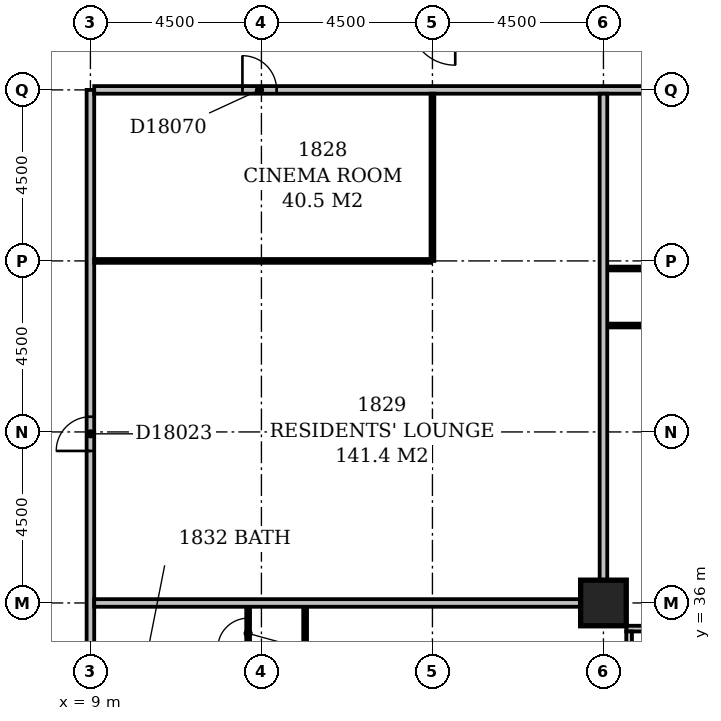
"""IFC4 building model, lengths in metres.
Left out: names, types, materials, properties, quantities, classifications, styles, units other than length and angle.
Written with IfcOpenShell. Run it as: python <this file> out.ifc"""

import sys

from ifc_helpers import new_model, si_unit, direction, frame, frame_2d, origin, origin_2d, place, context, subcontext, project, spatial, rectangle, extrude, element, fill, save


model = new_model("IFC4")
c1 = context("Model", 3, precision=1e-05, world=origin(), true_north=direction((0.0, 1.0)))
c2 = subcontext(c1, "Body", "Model", "MODEL_VIEW")
j1 = project(units=[si_unit("LENGTHUNIT", "METRE"), si_unit("PLANEANGLEUNIT", "RADIAN")], contexts=[c1])
p1 = place(None, origin())
s1 = spatial("IfcSite", under=j1, at=p1, CompositionType="ELEMENT")
p2 = place(p1, origin())
s2 = spatial("IfcBuilding", under=s1, at=p2, CompositionType="ELEMENT")
p3 = place(p2, frame((0.0, 0.0, 75.8)))
s3 = spatial("IfcBuildingStorey", under=s2, at=p3, CompositionType="ELEMENT", Elevation=75.8)
p4 = place(p3, frame((22.5, 36.0, -0.3), z_axis=(0.0, 0.0, 1.0), x_axis=(1.0, 0.0, 0.0)))
e1 = element("IfcColumn", 1, at=p4, inside=s3, PredefinedType="COLUMN", context=c2, shape_type="SweptSolid", body=[
    extrude(rectangle(XDim=1.2, YDim=1.2, at=origin_2d()), origin(), (0.0, 0.0, 1.0), 3.6),
])
p5 = place(p3, frame((23.175, 17.4, 0.0), z_axis=(0.0, 0.0, 1.0), x_axis=(0.0, 1.0, 0.0)))
e2 = element("IfcWall", 2, at=p5, inside=s3, PredefinedType="STANDARD", context=c2, shape_type="SweptSolid", body=[
    extrude(rectangle(XDim=17.85, YDim=0.15, at=frame_2d((8.925, 0.0))), origin(), (0.0, 0.0, 1.0), 2.7),
])
p6 = place(p5, frame((1.65, 0.0, 0.6)))
e3 = element("IfcOpeningElement", 3, at=p6, cuts=e2, PredefinedType="OPENING", context=c2, shape_type="SweptSolid", body=[
    extrude(rectangle(XDim=2.4, YDim=1.8, at=frame_2d((1.2, 0.9))), frame((0.0, 0.087, 0.0), z_axis=(0.0, -1.0, 0.0), x_axis=(1.0, 0.0, 0.0)), (0.0, 0.0, 1.0), 0.174),
])
p7 = place(p5, frame((6.15, 0.0, 0.6)))
e4 = element("IfcOpeningElement", 4, at=p7, cuts=e2, PredefinedType="OPENING", context=c2, shape_type="SweptSolid", body=[
    extrude(rectangle(XDim=2.4, YDim=1.8, at=frame_2d((1.2, 0.9))), frame((0.0, 0.087, 0.0), z_axis=(0.0, -1.0, 0.0), x_axis=(1.0, 0.0, 0.0)), (0.0, 0.0, 1.0), 0.174),
])
p8 = place(p5, frame((10.483, 0.0, 0.6)))
e5 = element("IfcOpeningElement", 5, at=p8, cuts=e2, PredefinedType="OPENING", context=c2, shape_type="SweptSolid", body=[
    extrude(rectangle(XDim=1.5, YDim=1.8, at=frame_2d((0.75, 0.9))), frame((0.0, 0.087, 0.0), z_axis=(0.0, -1.0, 0.0), x_axis=(1.0, 0.0, 0.0)), (0.0, 0.0, 1.0), 0.174),
])
p9 = place(p5, frame((15.15, 0.0, 0.6)))
e6 = element("IfcOpeningElement", 6, at=p9, cuts=e2, PredefinedType="OPENING", context=c2, shape_type="SweptSolid", body=[
    extrude(rectangle(XDim=2.4, YDim=1.8, at=frame_2d((1.2, 0.9))), frame((0.0, 0.087, 0.0), z_axis=(0.0, -1.0, 0.0), x_axis=(1.0, 0.0, 0.0)), (0.0, 0.0, 1.0), 0.174),
])
p10 = place(p3, frame((23.1, 35.325, 0.0), z_axis=(0.0, 0.0, 1.0), x_axis=(1.0, 0.0, 0.0)))
e7 = element("IfcWall", 7, at=p10, inside=s3, PredefinedType="STANDARD", context=c2, shape_type="SweptSolid", body=[
    extrude(rectangle(XDim=45.15, YDim=0.15, at=frame_2d((22.575, 0.0))), origin(), (0.0, 0.0, 1.0), 2.7),
])
p11 = place(p10, frame((0.45, 0.0, 0.6)))
e8 = element("IfcOpeningElement", 8, at=p11, cuts=e7, PredefinedType="OPENING", context=c2, shape_type="SweptSolid", body=[
    extrude(rectangle(XDim=2.4, YDim=1.8, at=frame_2d((1.2, 0.9))), frame((0.0, 0.087, 0.0), z_axis=(0.0, -1.0, 0.0), x_axis=(1.0, 0.0, 0.0)), (0.0, 0.0, 1.0), 0.174),
])
p12 = place(p10, frame((4.95, 0.0, 0.6)))
e9 = element("IfcOpeningElement", 9, at=p12, cuts=e7, PredefinedType="OPENING", context=c2, shape_type="SweptSolid", body=[
    extrude(rectangle(XDim=2.4, YDim=1.8, at=frame_2d((1.2, 0.9))), frame((0.0, 0.087, 0.0), z_axis=(0.0, -1.0, 0.0), x_axis=(1.0, 0.0, 0.0)), (0.0, 0.0, 1.0), 0.174),
])
p13 = place(p10, frame((10.548, 0.0, 0.6)))
e10 = element("IfcOpeningElement", 10, at=p13, cuts=e7, PredefinedType="OPENING", context=c2, shape_type="SweptSolid", body=[
    extrude(rectangle(XDim=1.5, YDim=1.8, at=frame_2d((0.75, 0.9))), frame((0.0, 0.087, 0.0), z_axis=(0.0, -1.0, 0.0), x_axis=(1.0, 0.0, 0.0)), (0.0, 0.0, 1.0), 0.174),
])
p14 = place(p10, frame((13.71, 0.0, 0.6)))
e11 = element("IfcOpeningElement", 11, at=p14, cuts=e7, PredefinedType="OPENING", context=c2, shape_type="SweptSolid", body=[
    extrude(rectangle(XDim=1.8, YDim=1.8, at=frame_2d((0.9, 0.9))), frame((0.0, 0.087, 0.0), z_axis=(0.0, -1.0, 0.0), x_axis=(1.0, 0.0, 0.0)), (0.0, 0.0, 1.0), 0.174),
])
p15 = place(p10, frame((18.45, 0.0, 0.6)))
e12 = element("IfcOpeningElement", 12, at=p15, cuts=e7, PredefinedType="OPENING", context=c2, shape_type="SweptSolid", body=[
    extrude(rectangle(XDim=2.4, YDim=1.8, at=frame_2d((1.2, 0.9))), frame((0.0, 0.087, 0.0), z_axis=(0.0, -1.0, 0.0), x_axis=(1.0, 0.0, 0.0)), (0.0, 0.0, 1.0), 0.174),
])
p16 = place(p10, frame((22.95, 0.0, 0.6)))
e13 = element("IfcOpeningElement", 13, at=p16, cuts=e7, PredefinedType="OPENING", context=c2, shape_type="SweptSolid", body=[
    extrude(rectangle(XDim=2.4, YDim=1.8, at=frame_2d((1.2, 0.9))), frame((0.0, 0.087, 0.0), z_axis=(0.0, -1.0, 0.0), x_axis=(1.0, 0.0, 0.0)), (0.0, 0.0, 1.0), 0.174),
])
p17 = place(p10, frame((27.45, 0.0, 0.6)))
e14 = element("IfcOpeningElement", 14, at=p17, cuts=e7, PredefinedType="OPENING", context=c2, shape_type="SweptSolid", body=[
    extrude(rectangle(XDim=2.4, YDim=1.8, at=frame_2d((1.2, 0.9))), frame((0.0, 0.087, 0.0), z_axis=(0.0, -1.0, 0.0), x_axis=(1.0, 0.0, 0.0)), (0.0, 0.0, 1.0), 0.174),
])
p18 = place(p10, frame((31.95, 0.0, 0.6)))
e15 = element("IfcOpeningElement", 15, at=p18, cuts=e7, PredefinedType="OPENING", context=c2, shape_type="SweptSolid", body=[
    extrude(rectangle(XDim=2.4, YDim=1.8, at=frame_2d((1.2, 0.9))), frame((0.0, 0.087, 0.0), z_axis=(0.0, -1.0, 0.0), x_axis=(1.0, 0.0, 0.0)), (0.0, 0.0, 1.0), 0.174),
])
p19 = place(p10, frame((36.331, 0.0, 0.6)))
e16 = element("IfcOpeningElement", 16, at=p19, cuts=e7, PredefinedType="OPENING", context=c2, shape_type="SweptSolid", body=[
    extrude(rectangle(XDim=2.1, YDim=1.8, at=frame_2d((1.05, 0.9))), frame((0.0, 0.087, 0.0), z_axis=(0.0, -1.0, 0.0), x_axis=(1.0, 0.0, 0.0)), (0.0, 0.0, 1.0), 0.174),
])
p20 = place(p10, frame((40.95, 0.0, 0.6)))
e17 = element("IfcOpeningElement", 17, at=p20, cuts=e7, PredefinedType="OPENING", context=c2, shape_type="SweptSolid", body=[
    extrude(rectangle(XDim=2.4, YDim=1.8, at=frame_2d((1.2, 0.9))), frame((0.0, 0.087, 0.0), z_axis=(0.0, -1.0, 0.0), x_axis=(1.0, 0.0, 0.0)), (0.0, 0.0, 1.0), 0.174),
])
p21 = place(p3, frame((9.0, 5.0, 0.0), z_axis=(0.0, 0.0, 1.0), x_axis=(0.0, 1.0, 0.0)))
e18 = element("IfcWall", 18, at=p21, inside=s3, PredefinedType="PARTITIONING", context=c2, shape_type="SweptSolid", body=[
    extrude(rectangle(XDim=44.5, YDim=0.2, at=frame_2d((22.25, 0.0))), origin(), (0.0, 0.0, 1.0), 3.3),
])
p22 = place(p21, frame((17.8, 0.0, 0.0)))
e19 = element("IfcOpeningElement", 19, at=p22, cuts=e18, PredefinedType="OPENING", context=c2, shape_type="SweptSolid", body=[
    extrude(rectangle(XDim=1.0, YDim=2.1, at=frame_2d((0.5, 1.05))), frame((0.0, 0.112, 0.0), z_axis=(0.0, -1.0, 0.0), x_axis=(1.0, 0.0, 0.0)), (0.0, 0.0, 1.0), 0.224),
])
p23 = place(p21, frame((14.95, 0.0, 0.0)))
e20 = element("IfcOpeningElement", 20, at=p23, cuts=e18, PredefinedType="OPENING", context=c2, shape_type="SweptSolid", body=[
    extrude(rectangle(XDim=1.0, YDim=2.1, at=frame_2d((0.5, 1.05))), frame((0.0, 0.112, 0.0), z_axis=(0.0, -1.0, 0.0), x_axis=(1.0, 0.0, 0.0)), (0.0, 0.0, 1.0), 0.224),
])
p24 = place(p21, frame((10.45, 0.0, 0.0)))
e21 = element("IfcOpeningElement", 21, at=p24, cuts=e18, PredefinedType="OPENING", context=c2, shape_type="SweptSolid", body=[
    extrude(rectangle(XDim=1.0, YDim=2.1, at=frame_2d((0.5, 1.05))), frame((0.0, 0.112, 0.0), z_axis=(0.0, -1.0, 0.0), x_axis=(1.0, 0.0, 0.0)), (0.0, 0.0, 1.0), 0.224),
])
p25 = place(p21, frame((5.95, 0.0, 0.0)))
e22 = element("IfcOpeningElement", 22, at=p25, cuts=e18, PredefinedType="OPENING", context=c2, shape_type="SweptSolid", body=[
    extrude(rectangle(XDim=1.0, YDim=2.1, at=frame_2d((0.5, 1.05))), frame((0.0, 0.112, 0.0), z_axis=(0.0, -1.0, 0.0), x_axis=(1.0, 0.0, 0.0)), (0.0, 0.0, 1.0), 0.224),
])
p26 = place(p21, frame((35.0, 0.0, 0.0)))
e23 = element("IfcOpeningElement", 23, at=p26, cuts=e18, PredefinedType="OPENING", context=c2, shape_type="SweptSolid", body=[
    extrude(rectangle(XDim=0.9, YDim=2.1, at=frame_2d((0.45, 1.05))), frame((0.0, 0.112, 0.0), z_axis=(0.0, -1.0, 0.0), x_axis=(1.0, 0.0, 0.0)), (0.0, 0.0, 1.0), 0.224),
])
p27 = place(p21, frame((1.5, 0.0, 0.0)))
e24 = element("IfcOpeningElement", 24, at=p27, cuts=e18, PredefinedType="OPENING", context=c2, shape_type="SweptSolid", body=[
    extrude(rectangle(XDim=0.9, YDim=2.1, at=frame_2d((0.45, 1.05))), frame((0.0, 0.112, 0.0), z_axis=(0.0, -1.0, 0.0), x_axis=(1.0, 0.0, 0.0)), (0.0, 0.0, 1.0), 0.224),
])
p28 = place(p3, frame((14.65, 22.6, 0.0), z_axis=(0.0, 0.0, 1.0), x_axis=(0.0, 1.0, 0.0)))
e25 = element("IfcWall", 25, at=p28, inside=s3, PredefinedType="PARTITIONING", context=c2, shape_type="SweptSolid", body=[
    extrude(rectangle(XDim=13.3, YDim=0.1, at=frame_2d((6.65, 0.0))), origin(), (0.0, 0.0, 1.0), 3.3),
])
p29 = place(p28, frame((1.7, 0.0, 0.0)))
e26 = element("IfcOpeningElement", 26, at=p29, cuts=e25, PredefinedType="OPENING", context=c2, shape_type="SweptSolid", body=[
    extrude(rectangle(XDim=0.9, YDim=2.1, at=frame_2d((0.45, 1.05))), frame((0.0, 0.062, 0.0), z_axis=(0.0, -1.0, 0.0), x_axis=(1.0, 0.0, 0.0)), (0.0, 0.0, 1.0), 0.124),
])
p30 = place(p28, frame((6.2, 0.0, 0.0)))
e27 = element("IfcOpeningElement", 27, at=p30, cuts=e25, PredefinedType="OPENING", context=c2, shape_type="SweptSolid", body=[
    extrude(rectangle(XDim=0.9, YDim=2.1, at=frame_2d((0.45, 1.05))), frame((0.0, 0.062, 0.0), z_axis=(0.0, -1.0, 0.0), x_axis=(1.0, 0.0, 0.0)), (0.0, 0.0, 1.0), 0.124),
])
p31 = place(p28, frame((10.7, 0.0, 0.0)))
e28 = element("IfcOpeningElement", 28, at=p31, cuts=e25, PredefinedType="OPENING", context=c2, shape_type="SweptSolid", body=[
    extrude(rectangle(XDim=0.9, YDim=2.1, at=frame_2d((0.45, 1.05))), frame((0.0, 0.062, 0.0), z_axis=(0.0, -1.0, 0.0), x_axis=(1.0, 0.0, 0.0)), (0.0, 0.0, 1.0), 0.124),
])
p32 = place(p3, frame((13.15, 24.1, 0.0), z_axis=(0.0, 0.0, 1.0), x_axis=(0.0, 1.0, 0.0)))
e29 = element("IfcWall", 29, at=p32, inside=s3, PredefinedType="PARTITIONING", context=c2, shape_type="SweptSolid", body=[
    extrude(rectangle(XDim=11.8, YDim=0.1, at=frame_2d((5.9, 0.0))), origin(), (0.0, 0.0, 1.0), 3.3),
])
p33 = place(p32, frame((8.7, 0.0, 0.0)))
e30 = element("IfcOpeningElement", 30, at=p33, cuts=e29, PredefinedType="OPENING", context=c2, shape_type="SweptSolid", body=[
    extrude(rectangle(XDim=0.8, YDim=2.1, at=frame_2d((0.4, 1.05))), frame((0.0, 0.062, 0.0), z_axis=(0.0, -1.0, 0.0), x_axis=(1.0, 0.0, 0.0)), (0.0, 0.0, 1.0), 0.124),
])
p34 = place(p32, frame((3.5, 0.0, 0.0)))
e31 = element("IfcOpeningElement", 31, at=p34, cuts=e29, PredefinedType="OPENING", context=c2, shape_type="SweptSolid", body=[
    extrude(rectangle(XDim=0.9, YDim=2.1, at=frame_2d((0.45, 1.05))), frame((0.0, 0.062, 0.0), z_axis=(0.0, -1.0, 0.0), x_axis=(1.0, 0.0, 0.0)), (0.0, 0.0, 1.0), 0.124),
])
p35 = place(p32, frame((10.7, 0.0, 0.0)))
e32 = element("IfcOpeningElement", 32, at=p35, cuts=e29, PredefinedType="OPENING", context=c2, shape_type="SweptSolid", body=[
    extrude(rectangle(XDim=0.8, YDim=2.1, at=frame_2d((0.4, 1.05))), frame((0.0, 0.062, 0.0), z_axis=(0.0, -1.0, 0.0), x_axis=(1.0, 0.0, 0.0)), (0.0, 0.0, 1.0), 0.124),
])
p36 = place(p3, frame((9.1, 36.0, 0.0), z_axis=(0.0, 0.0, 1.0), x_axis=(1.0, 0.0, 0.0)))
e33 = element("IfcWall", 33, at=p36, inside=s3, PredefinedType="PARTITIONING", context=c2, shape_type="SweptSolid", body=[
    extrude(rectangle(XDim=12.8, YDim=0.2, at=frame_2d((6.4, 0.0))), origin(), (0.0, 0.0, 1.0), 2.4),
])
p37 = place(p3, frame((22.5, 36.6, 0.0), z_axis=(0.0, 0.0, 1.0), x_axis=(0.0, 1.0, 0.0)))
e34 = element("IfcWall", 34, at=p37, inside=s3, PredefinedType="PARTITIONING", context=c2, shape_type="SweptSolid", body=[
    extrude(rectangle(XDim=12.8, YDim=0.2, at=frame_2d((6.4, 0.0))), origin(), (0.0, 0.0, 1.0), 3.3),
])
p38 = place(p3, frame((22.6, 43.3, 0.0), z_axis=(0.0, 0.0, 1.0), x_axis=(1.0, 0.0, 0.0)))
e35 = element("IfcWall", 35, at=p38, inside=s3, PredefinedType="PARTITIONING", context=c2, shape_type="SweptSolid", body=[
    extrude(rectangle(XDim=8.8, YDim=0.1, at=frame_2d((4.4, 0.0))), origin(), (0.0, 0.0, 1.0), 3.3),
])
p39 = place(p38, frame((1.7, 0.0, 0.0)))
e36 = element("IfcOpeningElement", 36, at=p39, cuts=e35, PredefinedType="OPENING", context=c2, shape_type="SweptSolid", body=[
    extrude(rectangle(XDim=0.9, YDim=2.1, at=frame_2d((0.45, 1.05))), frame((0.0, 0.062, 0.0), z_axis=(0.0, -1.0, 0.0), x_axis=(1.0, 0.0, 0.0)), (0.0, 0.0, 1.0), 0.124),
])
p40 = place(p38, frame((5.05, 0.0, 0.0)))
e37 = element("IfcOpeningElement", 37, at=p40, cuts=e35, PredefinedType="OPENING", context=c2, shape_type="SweptSolid", body=[
    extrude(rectangle(XDim=0.9, YDim=2.1, at=frame_2d((0.45, 1.05))), frame((0.0, 0.062, 0.0), z_axis=(0.0, -1.0, 0.0), x_axis=(1.0, 0.0, 0.0)), (0.0, 0.0, 1.0), 0.124),
])
p41 = place(p3, frame((22.6, 44.8, 0.0), z_axis=(0.0, 0.0, 1.0), x_axis=(1.0, 0.0, 0.0)))
e38 = element("IfcWall", 38, at=p41, inside=s3, PredefinedType="PARTITIONING", context=c2, shape_type="SweptSolid", body=[
    extrude(rectangle(XDim=4.85, YDim=0.1, at=frame_2d((2.425, 0.0))), origin(), (0.0, 0.0, 1.0), 3.3),
])
p42 = place(p41, frame((1.95, 0.0, 0.0)))
e39 = element("IfcOpeningElement", 39, at=p42, cuts=e38, PredefinedType="OPENING", context=c2, shape_type="SweptSolid", body=[
    extrude(rectangle(XDim=0.9, YDim=2.1, at=frame_2d((0.45, 1.05))), frame((0.0, 0.062, 0.0), z_axis=(0.0, -1.0, 0.0), x_axis=(1.0, 0.0, 0.0)), (0.0, 0.0, 1.0), 0.124),
])
p43 = place(p3, frame((9.1, 45.0, 0.0), z_axis=(0.0, 0.0, 1.0), x_axis=(1.0, 0.0, 0.0)))
e40 = element("IfcWall", 40, at=p43, inside=s3, PredefinedType="PARTITIONING", context=c2, shape_type="SweptSolid", body=[
    extrude(rectangle(XDim=8.85, YDim=0.1, at=frame_2d((4.425, 0.0))), origin(), (0.0, 0.0, 1.0), 3.3),
])
p44 = place(p3, frame((18.0, 45.0, 0.0), z_axis=(0.0, 0.0, 1.0), x_axis=(0.0, 1.0, 0.0)))
e41 = element("IfcWall", 41, at=p44, inside=s3, PredefinedType="PARTITIONING", context=c2, shape_type="SweptSolid", body=[
    extrude(rectangle(XDim=4.4, YDim=0.1, at=frame_2d((2.2, 0.0))), origin(), (0.0, 0.0, 1.0), 3.3),
])
p45 = place(p3, frame((9.1, 49.5, 0.0), z_axis=(0.0, 0.0, 1.0), x_axis=(1.0, 0.0, 0.0)))
e42 = element("IfcWall", 42, at=p45, inside=s3, PredefinedType="PARTITIONING", context=c2, shape_type="SweptSolid", body=[
    extrude(rectangle(XDim=57.8, YDim=0.2, at=frame_2d((28.9, 0.0))), origin(), (0.0, 0.0, 1.0), 3.3),
])
p46 = place(p45, frame((18.7, 0.0, 0.0)))
e43 = element("IfcOpeningElement", 43, at=p46, cuts=e42, PredefinedType="OPENING", context=c2, shape_type="SweptSolid", body=[
    extrude(rectangle(XDim=1.0, YDim=2.1, at=frame_2d((0.5, 1.05))), frame((0.0, 0.112, 0.0), z_axis=(0.0, -1.0, 0.0), x_axis=(1.0, 0.0, 0.0)), (0.0, 0.0, 1.0), 0.224),
])
p47 = place(p45, frame((24.35, 0.0, 0.0)))
e44 = element("IfcOpeningElement", 44, at=p47, cuts=e42, PredefinedType="OPENING", context=c2, shape_type="SweptSolid", body=[
    extrude(rectangle(XDim=1.0, YDim=2.1, at=frame_2d((0.5, 1.05))), frame((0.0, 0.112, 0.0), z_axis=(0.0, -1.0, 0.0), x_axis=(1.0, 0.0, 0.0)), (0.0, 0.0, 1.0), 0.224),
])
p48 = place(p45, frame((27.2, 0.0, 0.0)))
e45 = element("IfcOpeningElement", 45, at=p48, cuts=e42, PredefinedType="OPENING", context=c2, shape_type="SweptSolid", body=[
    extrude(rectangle(XDim=1.0, YDim=2.1, at=frame_2d((0.5, 1.05))), frame((0.0, 0.112, 0.0), z_axis=(0.0, -1.0, 0.0), x_axis=(1.0, 0.0, 0.0)), (0.0, 0.0, 1.0), 0.224),
])
p49 = place(p45, frame((43.1, 0.0, 0.0)))
e46 = element("IfcOpeningElement", 46, at=p49, cuts=e42, PredefinedType="OPENING", context=c2, shape_type="SweptSolid", body=[
    extrude(rectangle(XDim=1.0, YDim=2.1, at=frame_2d((0.5, 1.05))), frame((0.0, 0.112, 0.0), z_axis=(0.0, -1.0, 0.0), x_axis=(1.0, 0.0, 0.0)), (0.0, 0.0, 1.0), 0.224),
])
p50 = place(p45, frame((3.9, 0.0, 0.0)))
e47 = element("IfcOpeningElement", 47, at=p50, cuts=e42, PredefinedType="OPENING", context=c2, shape_type="SweptSolid", body=[
    extrude(rectangle(XDim=0.9, YDim=2.1, at=frame_2d((0.45, 1.05))), frame((0.0, 0.112, 0.0), z_axis=(0.0, -1.0, 0.0), x_axis=(1.0, 0.0, 0.0)), (0.0, 0.0, 1.0), 0.224),
])
p51 = place(p26, origin())
e48 = element("IfcDoor", 48, at=p51, inside=s3, OperationType="SINGLE_SWING_LEFT", PredefinedType="DOOR", context=c2, shape_type="SweptSolid", body=[
    extrude(rectangle(XDim=0.9, YDim=2.1, at=frame_2d((0.45, 1.05))), frame((0.0, 0.025, 0.0), z_axis=(0.0, -1.0, 0.0), x_axis=(1.0, 0.0, 0.0)), (0.0, 0.0, 1.0), 0.05),
])
fill(e23, e48)
p52 = place(p35, origin())
e49 = element("IfcDoor", 49, at=p52, inside=s3, OperationType="SINGLE_SWING_LEFT", PredefinedType="DOOR", context=c2, shape_type="SweptSolid", body=[
    extrude(rectangle(XDim=0.8, YDim=2.1, at=frame_2d((0.4, 1.05))), frame((0.0, 0.025, 0.0), z_axis=(0.0, -1.0, 0.0), x_axis=(1.0, 0.0, 0.0)), (0.0, 0.0, 1.0), 0.05),
])
fill(e32, e49)
p53 = place(p50, origin())
e50 = element("IfcDoor", 50, at=p53, inside=s3, OperationType="SINGLE_SWING_LEFT", PredefinedType="DOOR", context=c2, shape_type="SweptSolid", body=[
    extrude(rectangle(XDim=0.9, YDim=2.1, at=frame_2d((0.45, 1.05))), frame((0.0, 0.025, 0.0), z_axis=(0.0, -1.0, 0.0), x_axis=(1.0, 0.0, 0.0)), (0.0, 0.0, 1.0), 0.05),
])
fill(e47, e50)
save(model, sys.argv[1])
